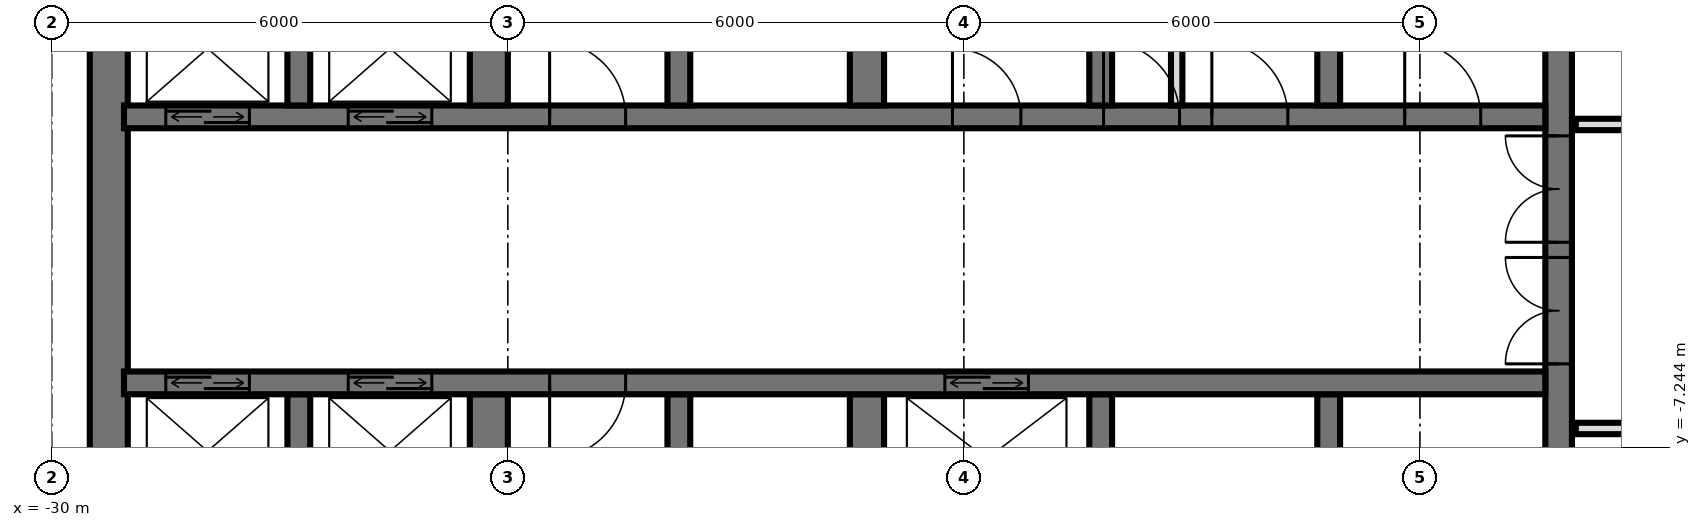
"""IFC4 building model, lengths in metres.
Left out: names, types, materials, properties, quantities, classifications, styles, units other than length and angle.
Written with IfcOpenShell. Run it as: python <this file> out.ifc"""

import sys

from ifc_helpers import new_model, si_unit, direction, frame, frame_2d, origin, place, context, subcontext, project, spatial, rectangle, extrude, element, fill, save


model = new_model("IFC4")
c1 = context("Model", 3, precision=1e-05, world=origin(), true_north=direction((0.0, 1.0)))
c2 = subcontext(c1, "Body", "Model", "MODEL_VIEW")
j1 = project(units=[si_unit("LENGTHUNIT", "METRE"), si_unit("PLANEANGLEUNIT", "RADIAN")], contexts=[c1])
p1 = place(None, origin())
s1 = spatial("IfcSite", under=j1, at=p1, CompositionType="ELEMENT")
p2 = place(p1, origin())
s2 = spatial("IfcBuilding", under=s1, at=p2, CompositionType="ELEMENT")
p3 = place(p2, frame((0.0, 0.0, 88.8)))
s3 = spatial("IfcBuildingStorey", under=s2, at=p3, CompositionType="ELEMENT", Elevation=88.8)
p4 = place(p3, frame((-10.175, -14.55, 0.0), z_axis=(0.0, 0.0, 1.0), x_axis=(0.0, 1.0, 0.0)))
e1 = element("IfcWall", 1, at=p4, inside=s3, PredefinedType="SHEAR", context=c2, shape_type="SweptSolid", body=[
    extrude(rectangle(XDim=14.1, YDim=0.35, at=frame_2d((7.05, 0.0))), origin(), (0.0, 0.0, 1.0), 3.6),
])
p5 = place(p4, frame((8.4, 0.0, 0.0)))
e2 = element("IfcOpeningElement", 2, at=p5, cuts=e1, PredefinedType="OPENING", context=c2, shape_type="SweptSolid", body=[
    extrude(rectangle(XDim=1.4, YDim=2.4, at=frame_2d((0.7, 1.2))), frame((0.0, 0.185, 0.0), z_axis=(0.0, -1.0, 0.0), x_axis=(1.0, 0.0, 0.0)), (0.0, 0.0, 1.0), 0.37),
])
p6 = place(p4, frame((10.0, 0.0, 0.0)))
e3 = element("IfcOpeningElement", 3, at=p6, cuts=e1, PredefinedType="OPENING", context=c2, shape_type="SweptSolid", body=[
    extrude(rectangle(XDim=1.4, YDim=2.4, at=frame_2d((0.7, 1.2))), frame((0.0, 0.185, 0.0), z_axis=(0.0, -1.0, 0.0), x_axis=(1.0, 0.0, 0.0)), (0.0, 0.0, 1.0), 0.37),
])
p7 = place(p4, frame((4.0, 0.0, 0.0)))
e4 = element("IfcOpeningElement", 4, at=p7, cuts=e1, PredefinedType="OPENING", context=c2, shape_type="SweptSolid", body=[
    extrude(rectangle(XDim=1.2, YDim=2.1, at=frame_2d((0.6, 1.05))), frame((0.0, 0.185, 0.0), z_axis=(0.0, -1.0, 0.0), x_axis=(1.0, 0.0, 0.0)), (0.0, 0.0, 1.0), 0.37),
])
p8 = place(p3, frame((-29.25, -14.55, 0.0), z_axis=(0.0, 0.0, 1.0), x_axis=(0.0, 1.0, 0.0)))
e5 = element("IfcWall", 5, at=p8, inside=s3, PredefinedType="SHEAR", context=c2, shape_type="SweptSolid", body=[
    extrude(rectangle(XDim=14.1, YDim=0.5, at=frame_2d((7.05, 0.0))), origin(), (0.0, 0.0, 1.0), 3.6),
])
p9 = place(p3, frame((-29.05, -2.9, 0.0), z_axis=(0.0, 0.0, 1.0), x_axis=(1.0, 0.0, 0.0)))
e6 = element("IfcWall", 6, at=p9, inside=s3, PredefinedType="SHEAR", context=c2, shape_type="SweptSolid", body=[
    extrude(rectangle(XDim=18.7, YDim=0.3, at=frame_2d((9.35, 0.0))), origin(), (0.0, 0.0, 1.0), 3.6),
])
p10 = place(p9, frame((2.95, 0.0, 0.0)))
e7 = element("IfcOpeningElement", 7, at=p10, cuts=e6, PredefinedType="OPENING", context=c2, shape_type="SweptSolid", body=[
    extrude(rectangle(XDim=1.1, YDim=2.1, at=frame_2d((0.55, 1.05))), frame((0.0, 0.16, 0.0), z_axis=(0.0, -1.0, 0.0), x_axis=(1.0, 0.0, 0.0)), (0.0, 0.0, 1.0), 0.32),
])
p11 = place(p9, frame((0.55, 0.0, 0.0)))
e8 = element("IfcOpeningElement", 8, at=p11, cuts=e6, PredefinedType="OPENING", context=c2, shape_type="SweptSolid", body=[
    extrude(rectangle(XDim=1.1, YDim=2.1, at=frame_2d((0.55, 1.05))), frame((0.0, 0.16, 0.0), z_axis=(0.0, -1.0, 0.0), x_axis=(1.0, 0.0, 0.0)), (0.0, 0.0, 1.0), 0.32),
])
p12 = place(p9, frame((10.9, 0.0, 0.0)))
e9 = element("IfcOpeningElement", 9, at=p12, cuts=e6, PredefinedType="OPENING", context=c2, shape_type="SweptSolid", body=[
    extrude(rectangle(XDim=0.9, YDim=2.1, at=frame_2d((0.45, 1.05))), frame((0.0, 0.16, 0.0), z_axis=(0.0, -1.0, 0.0), x_axis=(1.0, 0.0, 0.0)), (0.0, 0.0, 1.0), 0.32),
])
p13 = place(p9, frame((16.85, 0.0, 0.0)))
e10 = element("IfcOpeningElement", 10, at=p13, cuts=e6, PredefinedType="OPENING", context=c2, shape_type="SweptSolid", body=[
    extrude(rectangle(XDim=1.0, YDim=2.1, at=frame_2d((0.5, 1.05))), frame((0.0, 0.16, 0.0), z_axis=(0.0, -1.0, 0.0), x_axis=(1.0, 0.0, 0.0)), (0.0, 0.0, 1.0), 0.32),
])
p14 = place(p9, frame((14.312, 0.0, 0.0)))
e11 = element("IfcOpeningElement", 11, at=p14, cuts=e6, PredefinedType="OPENING", context=c2, shape_type="SweptSolid", body=[
    extrude(rectangle(XDim=1.0, YDim=2.1, at=frame_2d((0.5, 1.05))), frame((0.0, 0.16, 0.0), z_axis=(0.0, -1.0, 0.0), x_axis=(1.0, 0.0, 0.0)), (0.0, 0.0, 1.0), 0.32),
])
p15 = place(p9, frame((12.887, 0.0, 0.0)))
e12 = element("IfcOpeningElement", 12, at=p15, cuts=e6, PredefinedType="OPENING", context=c2, shape_type="SweptSolid", body=[
    extrude(rectangle(XDim=1.0, YDim=2.1, at=frame_2d((0.5, 1.05))), frame((0.0, 0.16, 0.0), z_axis=(0.0, -1.0, 0.0), x_axis=(1.0, 0.0, 0.0)), (0.0, 0.0, 1.0), 0.32),
])
p16 = place(p9, frame((5.6, 0.0, 0.0)))
e13 = element("IfcOpeningElement", 13, at=p16, cuts=e6, PredefinedType="OPENING", context=c2, shape_type="SweptSolid", body=[
    extrude(rectangle(XDim=1.0, YDim=2.1, at=frame_2d((0.5, 1.05))), frame((0.0, 0.16, 0.0), z_axis=(0.0, -1.0, 0.0), x_axis=(1.0, 0.0, 0.0)), (0.0, 0.0, 1.0), 0.32),
])
p17 = place(p3, frame((-29.05, -6.4, 0.0), z_axis=(0.0, 0.0, 1.0), x_axis=(1.0, 0.0, 0.0)))
e14 = element("IfcWall", 14, at=p17, inside=s3, PredefinedType="SHEAR", context=c2, shape_type="SweptSolid", body=[
    extrude(rectangle(XDim=18.7, YDim=0.3, at=frame_2d((9.35, 0.0))), origin(), (0.0, 0.0, 1.0), 3.6),
])
p18 = place(p17, frame((2.95, 0.0, 0.0)))
e15 = element("IfcOpeningElement", 15, at=p18, cuts=e14, PredefinedType="OPENING", context=c2, shape_type="SweptSolid", body=[
    extrude(rectangle(XDim=1.1, YDim=2.1, at=frame_2d((0.55, 1.05))), frame((0.0, 0.16, 0.0), z_axis=(0.0, -1.0, 0.0), x_axis=(1.0, 0.0, 0.0)), (0.0, 0.0, 1.0), 0.32),
])
p19 = place(p17, frame((0.55, 0.0, 0.0)))
e16 = element("IfcOpeningElement", 16, at=p19, cuts=e14, PredefinedType="OPENING", context=c2, shape_type="SweptSolid", body=[
    extrude(rectangle(XDim=1.1, YDim=2.1, at=frame_2d((0.55, 1.05))), frame((0.0, 0.16, 0.0), z_axis=(0.0, -1.0, 0.0), x_axis=(1.0, 0.0, 0.0)), (0.0, 0.0, 1.0), 0.32),
])
p20 = place(p17, frame((10.8, 0.0, 0.0)))
e17 = element("IfcOpeningElement", 17, at=p20, cuts=e14, PredefinedType="OPENING", context=c2, shape_type="SweptSolid", body=[
    extrude(rectangle(XDim=1.1, YDim=2.1, at=frame_2d((0.55, 1.05))), frame((0.0, 0.16, 0.0), z_axis=(0.0, -1.0, 0.0), x_axis=(1.0, 0.0, 0.0)), (0.0, 0.0, 1.0), 0.32),
])
p21 = place(p17, frame((5.6, 0.0, 0.0)))
e18 = element("IfcOpeningElement", 18, at=p21, cuts=e14, PredefinedType="OPENING", context=c2, shape_type="SweptSolid", body=[
    extrude(rectangle(XDim=1.0, YDim=2.1, at=frame_2d((0.5, 1.05))), frame((0.0, 0.16, 0.0), z_axis=(0.0, -1.0, 0.0), x_axis=(1.0, 0.0, 0.0)), (0.0, 0.0, 1.0), 0.32),
])
for number, where, z_axis, x_axis in (
    (19, (-13.2, -2.75, 0.0), (0.0, 0.0, 1.0), (0.0, 1.0, 0.0)),
    (20, (-13.2, -8.85, 0.0), (0.0, 0.0, 1.0), (0.0, 1.0, 0.0)),
    (21, (-16.2, -2.75, 0.0), (0.0, 0.0, 1.0), (0.0, 1.0, 0.0)),
    (22, (-16.2, -8.85, 0.0), (0.0, 0.0, 1.0), (0.0, 1.0, 0.0)),
):
    element("IfcWall", number, at=place(p3, frame(where, z_axis=z_axis, x_axis=x_axis)), inside=s3, PredefinedType="SHEAR", context=c2, shape_type="SweptSolid", body=[
        extrude(rectangle(XDim=2.3, YDim=0.3, at=frame_2d((1.15, 0.0))), origin(), (0.0, 0.0, 1.0), 3.6),
    ])
for number, where, z_axis, x_axis in (
    (23, (-19.275, -2.75, 0.0), (0.0, 0.0, 1.0), (0.0, 1.0, 0.0)),
    (24, (-19.275, -8.85, 0.0), (0.0, 0.0, 1.0), (0.0, 1.0, 0.0)),
):
    element("IfcWall", number, at=place(p3, frame(where, z_axis=z_axis, x_axis=x_axis)), inside=s3, PredefinedType="SHEAR", context=c2, shape_type="SweptSolid", body=[
        extrude(rectangle(XDim=2.3, YDim=0.45, at=frame_2d((1.15, 0.0))), origin(), (0.0, 0.0, 1.0), 3.6),
    ])
for number, where, z_axis, x_axis in (
    (25, (-21.75, -2.75, 0.0), (0.0, 0.0, 1.0), (0.0, 1.0, 0.0)),
    (26, (-21.75, -8.85, 0.0), (0.0, 0.0, 1.0), (0.0, 1.0, 0.0)),
):
    element("IfcWall", number, at=place(p3, frame(where, z_axis=z_axis, x_axis=x_axis)), inside=s3, PredefinedType="SHEAR", context=c2, shape_type="SweptSolid", body=[
        extrude(rectangle(XDim=2.3, YDim=0.3, at=frame_2d((1.15, 0.0))), origin(), (0.0, 0.0, 1.0), 3.6),
    ])
for number, where, z_axis, x_axis in (
    (27, (-24.25, -2.75, 0.0), (0.0, 0.0, 1.0), (0.0, 1.0, 0.0)),
    (28, (-24.25, -8.85, 0.0), (0.0, 0.0, 1.0), (0.0, 1.0, 0.0)),
):
    element("IfcWall", number, at=place(p3, frame(where, z_axis=z_axis, x_axis=x_axis)), inside=s3, PredefinedType="SHEAR", context=c2, shape_type="SweptSolid", body=[
        extrude(rectangle(XDim=2.3, YDim=0.5, at=frame_2d((1.15, 0.0))), origin(), (0.0, 0.0, 1.0), 3.6),
    ])
for number, where, z_axis, x_axis in (
    (29, (-26.75, -2.75, 0.0), (0.0, 0.0, 1.0), (0.0, 1.0, 0.0)),
    (30, (-26.75, -8.85, 0.0), (0.0, 0.0, 1.0), (0.0, 1.0, 0.0)),
):
    element("IfcWall", number, at=place(p3, frame(where, z_axis=z_axis, x_axis=x_axis)), inside=s3, PredefinedType="SHEAR", context=c2, shape_type="SweptSolid", body=[
        extrude(rectangle(XDim=2.3, YDim=0.3, at=frame_2d((1.15, 0.0))), origin(), (0.0, 0.0, 1.0), 3.6),
    ])
p22 = place(p3, frame((-15.2, -2.75, 0.0), z_axis=(0.0, 0.0, 1.0), x_axis=(0.0, 1.0, 0.0)))
e31 = element("IfcWall", 31, at=p22, inside=s3, PredefinedType="PARTITIONING", context=c2, shape_type="SweptSolid", body=[
    extrude(rectangle(XDim=2.3, YDim=0.15, at=frame_2d((1.15, 0.0))), origin(), (0.0, 0.0, 1.0), 3.3),
])
p23 = place(p3, frame((-9.95, -7.0, 0.0), z_axis=(0.0, 0.0, 1.0), x_axis=(1.0, 0.0, 0.0)))
e32 = element("IfcWall", 32, at=p23, inside=s3, PredefinedType="PARTITIONING", context=c2, shape_type="SweptSolid", body=[
    extrude(rectangle(XDim=19.9, YDim=0.15, at=frame_2d((9.95, 0.0))), origin(), (0.0, 0.0, 1.0), 3.32),
])
p24 = place(p23, frame((9.45, 0.0, 0.0)))
e33 = element("IfcOpeningElement", 33, at=p24, cuts=e32, PredefinedType="OPENING", context=c2, shape_type="SweptSolid", body=[
    extrude(rectangle(XDim=1.0, YDim=2.1, at=frame_2d((0.5, 1.05))), frame((0.0, 0.085, 0.0), z_axis=(0.0, -1.0, 0.0), x_axis=(1.0, 0.0, 0.0)), (0.0, 0.0, 1.0), 0.17),
])
p25 = place(p23, frame((3.45, 0.0, 0.0)))
e34 = element("IfcOpeningElement", 34, at=p25, cuts=e32, PredefinedType="OPENING", context=c2, shape_type="SweptSolid", body=[
    extrude(rectangle(XDim=1.0, YDim=2.1, at=frame_2d((0.5, 1.05))), frame((0.0, 0.085, 0.0), z_axis=(0.0, -1.0, 0.0), x_axis=(1.0, 0.0, 0.0)), (0.0, 0.0, 1.0), 0.17),
])
p26 = place(p3, frame((-9.95, -3.0, 0.0), z_axis=(0.0, 0.0, 1.0), x_axis=(1.0, 0.0, 0.0)))
e35 = element("IfcWall", 35, at=p26, inside=s3, PredefinedType="PARTITIONING", context=c2, shape_type="SweptSolid", body=[
    extrude(rectangle(XDim=19.9, YDim=0.15, at=frame_2d((9.95, 0.0))), origin(), (0.0, 0.0, 1.0), 3.32),
])
p27 = place(p26, frame((0.95, 0.0, 0.0)))
e36 = element("IfcOpeningElement", 36, at=p27, cuts=e35, PredefinedType="OPENING", context=c2, shape_type="SweptSolid", body=[
    extrude(rectangle(XDim=1.0, YDim=2.1, at=frame_2d((0.5, 1.05))), frame((0.0, 0.085, 0.0), z_axis=(0.0, -1.0, 0.0), x_axis=(1.0, 0.0, 0.0)), (0.0, 0.0, 1.0), 0.17),
])
p28 = place(p26, frame((3.7, 0.0, 0.0)))
e37 = element("IfcOpeningElement", 37, at=p28, cuts=e35, PredefinedType="OPENING", context=c2, shape_type="SweptSolid", body=[
    extrude(rectangle(XDim=1.0, YDim=2.1, at=frame_2d((0.5, 1.05))), frame((0.0, 0.085, 0.0), z_axis=(0.0, -1.0, 0.0), x_axis=(1.0, 0.0, 0.0)), (0.0, 0.0, 1.0), 0.17),
])
p29 = place(p26, frame((6.7, 0.0, 0.0)))
e38 = element("IfcOpeningElement", 38, at=p29, cuts=e35, PredefinedType="OPENING", context=c2, shape_type="SweptSolid", body=[
    extrude(rectangle(XDim=1.0, YDim=2.1, at=frame_2d((0.5, 1.05))), frame((0.0, 0.085, 0.0), z_axis=(0.0, -1.0, 0.0), x_axis=(1.0, 0.0, 0.0)), (0.0, 0.0, 1.0), 0.17),
])
p30 = place(p26, frame((13.95, 0.0, 0.0)))
e39 = element("IfcOpeningElement", 39, at=p30, cuts=e35, PredefinedType="OPENING", context=c2, shape_type="SweptSolid", body=[
    extrude(rectangle(XDim=1.0, YDim=2.1, at=frame_2d((0.5, 1.05))), frame((0.0, 0.085, 0.0), z_axis=(0.0, -1.0, 0.0), x_axis=(1.0, 0.0, 0.0)), (0.0, 0.0, 1.0), 0.17),
])
p31 = place(p10, origin())
e40 = element("IfcDoor", 40, at=p31, inside=s3, OperationType="DOUBLE_DOOR_SLIDING", PredefinedType="USERDEFINED", context=c2, shape_type="SweptSolid", body=[
    extrude(rectangle(XDim=1.1, YDim=2.1, at=frame_2d((0.55, 1.05))), frame((0.0, 0.025, 0.0), z_axis=(0.0, -1.0, 0.0), x_axis=(1.0, 0.0, 0.0)), (0.0, 0.0, 1.0), 0.05),
])
fill(e7, e40)
p32 = place(p11, origin())
e41 = element("IfcDoor", 41, at=p32, inside=s3, OperationType="DOUBLE_DOOR_SLIDING", PredefinedType="USERDEFINED", context=c2, shape_type="SweptSolid", body=[
    extrude(rectangle(XDim=1.1, YDim=2.1, at=frame_2d((0.55, 1.05))), frame((0.0, 0.025, 0.0), z_axis=(0.0, -1.0, 0.0), x_axis=(1.0, 0.0, 0.0)), (0.0, 0.0, 1.0), 0.05),
])
fill(e8, e41)
p33 = place(p18, origin())
e42 = element("IfcDoor", 42, at=p33, inside=s3, OperationType="DOUBLE_DOOR_SLIDING", PredefinedType="USERDEFINED", context=c2, shape_type="SweptSolid", body=[
    extrude(rectangle(XDim=1.1, YDim=2.1, at=frame_2d((0.55, 1.05))), frame((0.0, 0.025, 0.0), z_axis=(0.0, -1.0, 0.0), x_axis=(1.0, 0.0, 0.0)), (0.0, 0.0, 1.0), 0.05),
])
fill(e15, e42)
p34 = place(p19, origin())
e43 = element("IfcDoor", 43, at=p34, inside=s3, OperationType="DOUBLE_DOOR_SLIDING", PredefinedType="USERDEFINED", context=c2, shape_type="SweptSolid", body=[
    extrude(rectangle(XDim=1.1, YDim=2.1, at=frame_2d((0.55, 1.05))), frame((0.0, 0.025, 0.0), z_axis=(0.0, -1.0, 0.0), x_axis=(1.0, 0.0, 0.0)), (0.0, 0.0, 1.0), 0.05),
])
fill(e16, e43)
p35 = place(p20, origin())
e44 = element("IfcDoor", 44, at=p35, inside=s3, OperationType="DOUBLE_DOOR_SLIDING", PredefinedType="USERDEFINED", context=c2, shape_type="SweptSolid", body=[
    extrude(rectangle(XDim=1.1, YDim=2.1, at=frame_2d((0.55, 1.05))), frame((0.0, 0.025, 0.0), z_axis=(0.0, -1.0, 0.0), x_axis=(1.0, 0.0, 0.0)), (0.0, 0.0, 1.0), 0.05),
])
fill(e17, e44)
p36 = place(p5, origin())
e45 = element("IfcDoor", 45, at=p36, inside=s3, OperationType="DOUBLE_DOOR_SINGLE_SWING", PredefinedType="DOOR", context=c2, shape_type="SweptSolid", body=[
    extrude(rectangle(XDim=1.4, YDim=2.4, at=frame_2d((0.7, 1.2))), frame((0.0, 0.025, 0.0), z_axis=(0.0, -1.0, 0.0), x_axis=(1.0, 0.0, 0.0)), (0.0, 0.0, 1.0), 0.05),
])
fill(e2, e45)
p37 = place(p6, origin())
e46 = element("IfcDoor", 46, at=p37, inside=s3, OperationType="DOUBLE_DOOR_SINGLE_SWING", PredefinedType="DOOR", context=c2, shape_type="SweptSolid", body=[
    extrude(rectangle(XDim=1.4, YDim=2.4, at=frame_2d((0.7, 1.2))), frame((0.0, 0.025, 0.0), z_axis=(0.0, -1.0, 0.0), x_axis=(1.0, 0.0, 0.0)), (0.0, 0.0, 1.0), 0.05),
])
fill(e3, e46)
p38 = place(p12, origin())
e47 = element("IfcDoor", 47, at=p38, inside=s3, OperationType="SINGLE_SWING_RIGHT", PredefinedType="DOOR", context=c2, shape_type="SweptSolid", body=[
    extrude(rectangle(XDim=0.9, YDim=2.1, at=frame_2d((0.45, 1.05))), frame((0.0, 0.025, 0.0), z_axis=(0.0, -1.0, 0.0), x_axis=(1.0, 0.0, 0.0)), (0.0, 0.0, 1.0), 0.05),
])
fill(e9, e47)
p39 = place(p13, origin())
e48 = element("IfcDoor", 48, at=p39, inside=s3, OperationType="SINGLE_SWING_RIGHT", PredefinedType="DOOR", context=c2, shape_type="SweptSolid", body=[
    extrude(rectangle(XDim=1.0, YDim=2.1, at=frame_2d((0.5, 1.05))), frame((0.0, 0.025, 0.0), z_axis=(0.0, -1.0, 0.0), x_axis=(1.0, 0.0, 0.0)), (0.0, 0.0, 1.0), 0.05),
])
fill(e10, e48)
p40 = place(p14, origin())
e49 = element("IfcDoor", 49, at=p40, inside=s3, OperationType="SINGLE_SWING_RIGHT", PredefinedType="DOOR", context=c2, shape_type="SweptSolid", body=[
    extrude(rectangle(XDim=1.0, YDim=2.1, at=frame_2d((0.5, 1.05))), frame((0.0, 0.025, 0.0), z_axis=(0.0, -1.0, 0.0), x_axis=(1.0, 0.0, 0.0)), (0.0, 0.0, 1.0), 0.05),
])
fill(e11, e49)
p41 = place(p15, origin())
e50 = element("IfcDoor", 50, at=p41, inside=s3, OperationType="SINGLE_SWING_RIGHT", PredefinedType="DOOR", context=c2, shape_type="SweptSolid", body=[
    extrude(rectangle(XDim=1.0, YDim=2.1, at=frame_2d((0.5, 1.05))), frame((0.0, 0.025, 0.0), z_axis=(0.0, -1.0, 0.0), x_axis=(1.0, 0.0, 0.0)), (0.0, 0.0, 1.0), 0.05),
])
fill(e12, e50)
p42 = place(p16, origin())
e51 = element("IfcDoor", 51, at=p42, inside=s3, OperationType="SINGLE_SWING_RIGHT", PredefinedType="DOOR", context=c2, shape_type="SweptSolid", body=[
    extrude(rectangle(XDim=1.0, YDim=2.1, at=frame_2d((0.5, 1.05))), frame((0.0, 0.025, 0.0), z_axis=(0.0, -1.0, 0.0), x_axis=(1.0, 0.0, 0.0)), (0.0, 0.0, 1.0), 0.05),
])
fill(e13, e51)
p43 = place(p21, frame((0.5, 0.0, 0.0), z_axis=(0.0, 0.0, 1.0), x_axis=(-1.0, 0.0, 0.0)))
e52 = element("IfcDoor", 52, at=p43, inside=s3, OperationType="SINGLE_SWING_LEFT", PredefinedType="DOOR", context=c2, shape_type="SweptSolid", body=[
    extrude(rectangle(XDim=1.0, YDim=2.1, at=frame_2d((0.0, 1.05))), frame((0.0, -0.025, 0.0), z_axis=(0.0, 1.0, 0.0), x_axis=(-1.0, 0.0, 0.0)), (0.0, 0.0, 1.0), 0.05),
])
fill(e18, e52)
save(model, sys.argv[1])
